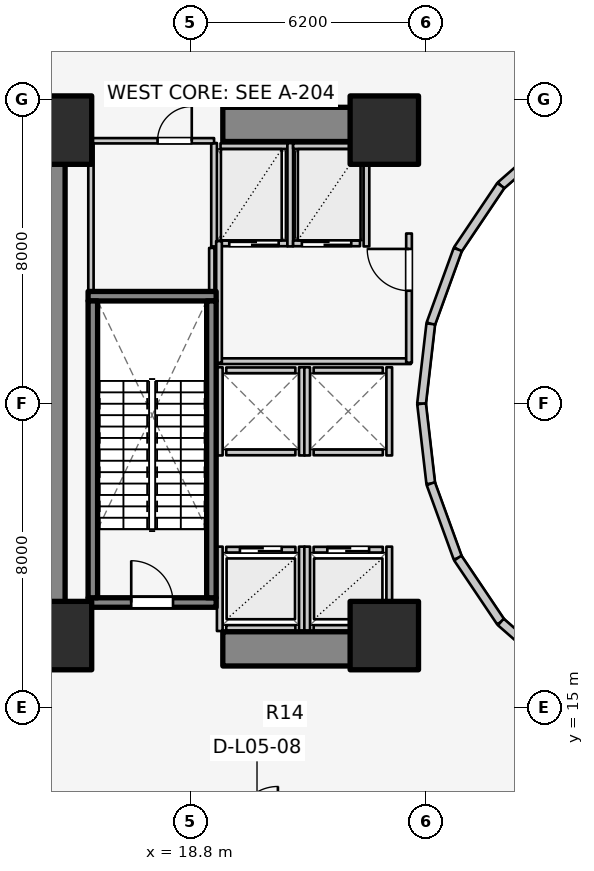
"""IFC4 building model, lengths in metres.
Left out: names, types, materials, properties, quantities, classifications, styles, units other than length and angle.
Written with IfcOpenShell. Run it as: python <this file> out.ifc"""

import sys

from ifc_helpers import new_model, si_unit, direction, frame, frame_2d, origin, origin_2d, place, context, subcontext, project, spatial, rectangle, extrude, element, fill, save


model = new_model("IFC4")
c1 = context("Model", 3, precision=1e-05, world=origin(), true_north=direction((0.0, 1.0)))
c2 = subcontext(c1, "Body", "Model", "MODEL_VIEW")
j1 = project(units=[si_unit("LENGTHUNIT", "METRE"), si_unit("PLANEANGLEUNIT", "RADIAN")], contexts=[c1])
p1 = place(None, origin())
s1 = spatial("IfcSite", under=j1, at=p1, CompositionType="ELEMENT")
p2 = place(p1, origin())
s2 = spatial("IfcBuilding", under=s1, at=p2, CompositionType="ELEMENT")
p3 = place(p2, frame((0.0, 0.0, 18.4)))
s3 = spatial("IfcBuildingStorey", under=s2, at=p3, CompositionType="ELEMENT", Elevation=18.4)
p4 = place(p3, frame((15.05, 17.05, 0.0), z_axis=(0.0, 0.0, 1.0), x_axis=(0.0, 1.0, 0.0)))
e1 = element("IfcWall", 1, at=p4, inside=s3, PredefinedType="SHEAR", context=c2, shape_type="SweptSolid", body=[
    extrude(rectangle(XDim=12.8, YDim=0.9, at=frame_2d((6.4, 0.0))), origin(), (0.0, 0.0, 1.0), 4.6),
])
for number, where, z_axis, x_axis in (
    (2, (19.65, 16.55, 0.0), (0.0, 0.0, 1.0), (1.0, 0.0, 0.0)),
    (3, (19.65, 30.35, 0.0), (0.0, 0.0, 1.0), (1.0, 0.0, 0.0)),
):
    element("IfcWall", number, at=place(p3, frame(where, z_axis=z_axis, x_axis=x_axis)), inside=s3, PredefinedType="SHEAR", context=c2, shape_type="SweptSolid", body=[
        extrude(rectangle(XDim=4.5, YDim=0.9, at=frame_2d((2.25, 0.0))), origin(), (0.0, 0.0, 1.0), 4.6),
    ])
p5 = place(p3, frame((16.105, 17.77, 0.0), z_axis=(0.0, 0.0, 1.0), x_axis=(1.0, 0.0, 0.0)))
e4 = element("IfcWall", 4, at=p5, inside=s3, PredefinedType="SOLIDWALL", context=c2, shape_type="SweptSolid", body=[
    extrude(rectangle(XDim=3.37, YDim=0.25, at=frame_2d((1.685, 0.0))), origin(), (0.0, 0.0, 1.0), 4.6),
])
p6 = place(p5, frame((1.135, 0.0, 0.0)))
e5 = element("IfcOpeningElement", 5, at=p6, cuts=e4, PredefinedType="OPENING", context=c2, shape_type="SweptSolid", body=[
    extrude(rectangle(XDim=1.1, YDim=2.1, at=frame_2d((0.55, 1.05))), frame((0.0, 0.135, 0.0), z_axis=(0.0, -1.0, 0.0), x_axis=(1.0, 0.0, 0.0)), (0.0, 0.0, 1.0), 0.27),
])
p7 = place(p3, frame((16.105, 25.83, 0.0), z_axis=(0.0, 0.0, 1.0), x_axis=(1.0, 0.0, 0.0)))
e6 = element("IfcWall", 6, at=p7, inside=s3, PredefinedType="SOLIDWALL", context=c2, shape_type="SweptSolid", body=[
    extrude(rectangle(XDim=3.37, YDim=0.25, at=frame_2d((1.685, 0.0))), origin(), (0.0, 0.0, 1.0), 4.6),
])
for number, where, z_axis, x_axis in (
    (7, (16.23, 17.895, 0.0), (0.0, 0.0, 1.0), (0.0, 1.0, 0.0)),
    (8, (19.35, 17.895, 0.0), (0.0, 0.0, 1.0), (0.0, 1.0, 0.0)),
):
    element("IfcWall", number, at=place(p3, frame(where, z_axis=z_axis, x_axis=x_axis)), inside=s3, PredefinedType="SOLIDWALL", context=c2, shape_type="SweptSolid", body=[
        extrude(rectangle(XDim=7.81, YDim=0.25, at=frame_2d((3.905, 0.0))), origin(), (0.0, 0.0, 1.0), 4.6),
    ])
for number, where, z_axis, x_axis in (
    (9, (15.3, 16.9, 0.0), (0.0, 0.0, 1.0), (1.0, 0.0, 0.0)),
    (10, (23.9, 16.9, 0.0), (0.0, 0.0, 1.0), (1.0, 0.0, 0.0)),
    (11, (23.9, 30.2, 0.0), (0.0, 0.0, 1.0), (1.0, 0.0, 0.0)),
    (12, (15.3, 30.2, 0.0), (0.0, 0.0, 1.0), (1.0, 0.0, 0.0)),
):
    element("IfcColumn", number, at=place(p3, frame(where, z_axis=z_axis, x_axis=x_axis)), inside=s3, PredefinedType="COLUMN", context=c2, shape_type="SweptSolid", body=[
        extrude(rectangle(XDim=1.8, YDim=1.8, at=origin_2d()), origin(), (0.0, 0.0, 1.0), 4.6),
    ])
p8 = place(p3, frame((28.44, 30.032, 0.0), z_axis=(0.0, 0.0, 1.0), x_axis=(-0.752576694707, -0.658504607869, 0.0)))
e13 = element("IfcWall", 13, at=p8, inside=s3, PredefinedType="STANDARD", context=c2, shape_type="SweptSolid", body=[
    extrude(rectangle(XDim=1.959, YDim=0.23, at=frame_2d((0.98, 0.0))), origin(), (0.0, 0.0, 1.0), 3.28),
])
p9 = place(p3, frame((26.965, 28.742, 0.0), z_axis=(0.0, 0.0, 1.0), x_axis=(-0.558197800898, -0.829707909492, 0.0)))
e14 = element("IfcWall", 14, at=p9, inside=s3, PredefinedType="STANDARD", context=c2, shape_type="SweptSolid", body=[
    extrude(rectangle(XDim=2.027, YDim=0.23, at=frame_2d((1.013, 0.0))), origin(), (0.0, 0.0, 1.0), 3.28),
])
p10 = place(p3, frame((25.834, 27.06, 0.0), z_axis=(0.0, 0.0, 1.0), x_axis=(-0.341423187295, -0.93990968033, 0.0)))
e15 = element("IfcWall", 15, at=p10, inside=s3, PredefinedType="STANDARD", context=c2, shape_type="SweptSolid", body=[
    extrude(rectangle(XDim=2.084, YDim=0.23, at=frame_2d((1.042, 0.0))), origin(), (0.0, 0.0, 1.0), 3.28),
])
for number, where, z_axis, x_axis in (
    (16, (25.123, 25.102, 0.0), (0.0, 0.0, 1.0), (-0.115, -0.993, 0.0)),
    (17, (24.88, 23.0, 0.0), (0.0, 0.0, 1.0), (0.115, -0.993, 0.0)),
):
    element("IfcWall", number, at=place(p3, frame(where, z_axis=z_axis, x_axis=x_axis)), inside=s3, PredefinedType="STANDARD", context=c2, shape_type="SweptSolid", body=[
        extrude(rectangle(XDim=2.115, YDim=0.23, at=frame_2d((1.058, 0.0))), origin(), (0.0, 0.0, 1.0), 3.28),
    ])
p11 = place(p3, frame((25.123, 20.898, 0.0), z_axis=(0.0, 0.0, 1.0), x_axis=(0.341423187295, -0.93990968033, 0.0)))
e18 = element("IfcWall", 18, at=p11, inside=s3, PredefinedType="STANDARD", context=c2, shape_type="SweptSolid", body=[
    extrude(rectangle(XDim=2.084, YDim=0.23, at=frame_2d((1.042, 0.0))), origin(), (0.0, 0.0, 1.0), 3.28),
])
p12 = place(p3, frame((25.834, 18.94, 0.0), z_axis=(0.0, 0.0, 1.0), x_axis=(0.558197800898, -0.829707909492, 0.0)))
e19 = element("IfcWall", 19, at=p12, inside=s3, PredefinedType="STANDARD", context=c2, shape_type="SweptSolid", body=[
    extrude(rectangle(XDim=2.027, YDim=0.23, at=frame_2d((1.013, 0.0))), origin(), (0.0, 0.0, 1.0), 3.28),
])
p13 = place(p3, frame((26.965, 17.258, 0.0), z_axis=(0.0, 0.0, 1.0), x_axis=(0.752576694707, -0.658504607869, 0.0)))
e20 = element("IfcWall", 20, at=p13, inside=s3, PredefinedType="STANDARD", context=c2, shape_type="SweptSolid", body=[
    extrude(rectangle(XDim=1.959, YDim=0.23, at=frame_2d((0.98, 0.0))), origin(), (0.0, 0.0, 1.0), 3.28),
])
p14 = place(p3, frame((19.74, 19.16, 0.0), z_axis=(0.0, 0.0, 1.0), x_axis=(1.0, 0.0, 0.0)))
e21 = element("IfcWall", 21, at=p14, inside=s3, PredefinedType="SOLIDWALL", context=c2, shape_type="SweptSolid", body=[
    extrude(rectangle(XDim=1.82, YDim=0.15, at=frame_2d((0.91, 0.0))), origin(), (0.0, 0.0, 1.0), 4.255),
])
p15 = place(p14, frame((0.36, 0.0, 0.0)))
e22 = element("IfcOpeningElement", 22, at=p15, cuts=e21, PredefinedType="OPENING", context=c2, shape_type="SweptSolid", body=[
    extrude(rectangle(XDim=1.1, YDim=2.1, at=frame_2d((0.55, 1.05))), frame((0.0, 0.085, 0.0), z_axis=(0.0, -1.0, 0.0), x_axis=(1.0, 0.0, 0.0)), (0.0, 0.0, 1.0), 0.17),
])
p16 = place(p3, frame((19.74, 17.1, 0.0), z_axis=(0.0, 0.0, 1.0), x_axis=(1.0, 0.0, 0.0)))
e23 = element("IfcWall", 23, at=p16, inside=s3, PredefinedType="SOLIDWALL", context=c2, shape_type="SweptSolid", body=[
    extrude(rectangle(XDim=1.82, YDim=0.15, at=frame_2d((0.91, 0.0))), origin(), (0.0, 0.0, 1.0), 4.255),
])
p17 = place(p3, frame((19.57, 17.02, 0.0), z_axis=(0.0, 0.0, 1.0), x_axis=(0.0, 1.0, 0.0)))
e24 = element("IfcWall", 24, at=p17, inside=s3, PredefinedType="SOLIDWALL", context=c2, shape_type="SweptSolid", body=[
    extrude(rectangle(XDim=2.22, YDim=0.15, at=frame_2d((1.11, 0.0))), origin(), (0.0, 0.0, 1.0), 3.62),
])
p18 = place(p3, frame((21.73, 17.02, 0.0), z_axis=(0.0, 0.0, 1.0), x_axis=(0.0, 1.0, 0.0)))
e25 = element("IfcWall", 25, at=p18, inside=s3, PredefinedType="SOLIDWALL", context=c2, shape_type="SweptSolid", body=[
    extrude(rectangle(XDim=2.22, YDim=0.15, at=frame_2d((1.11, 0.0))), origin(), (0.0, 0.0, 1.0), 4.255),
])
p19 = place(p3, frame((22.04, 19.16, 0.0), z_axis=(0.0, 0.0, 1.0), x_axis=(1.0, 0.0, 0.0)))
e26 = element("IfcWall", 26, at=p19, inside=s3, PredefinedType="SOLIDWALL", context=c2, shape_type="SweptSolid", body=[
    extrude(rectangle(XDim=1.82, YDim=0.15, at=frame_2d((0.91, 0.0))), origin(), (0.0, 0.0, 1.0), 3.62),
])
p20 = place(p19, frame((0.36, 0.0, 0.0)))
e27 = element("IfcOpeningElement", 27, at=p20, cuts=e26, PredefinedType="OPENING", context=c2, shape_type="SweptSolid", body=[
    extrude(rectangle(XDim=1.1, YDim=2.1, at=frame_2d((0.55, 1.05))), frame((0.0, 0.085, 0.0), z_axis=(0.0, -1.0, 0.0), x_axis=(1.0, 0.0, 0.0)), (0.0, 0.0, 1.0), 0.17),
])
p21 = place(p3, frame((22.04, 17.1, 0.0), z_axis=(0.0, 0.0, 1.0), x_axis=(1.0, 0.0, 0.0)))
e28 = element("IfcWall", 28, at=p21, inside=s3, PredefinedType="SOLIDWALL", context=c2, shape_type="SweptSolid", body=[
    extrude(rectangle(XDim=1.82, YDim=0.15, at=frame_2d((0.91, 0.0))), origin(), (0.0, 0.0, 1.0), 3.62),
])
p22 = place(p3, frame((21.87, 17.02, 0.0), z_axis=(0.0, 0.0, 1.0), x_axis=(0.0, 1.0, 0.0)))
e29 = element("IfcWall", 29, at=p22, inside=s3, PredefinedType="SOLIDWALL", context=c2, shape_type="SweptSolid", body=[
    extrude(rectangle(XDim=2.22, YDim=0.15, at=frame_2d((1.11, 0.0))), origin(), (0.0, 0.0, 1.0), 4.255),
])
p23 = place(p3, frame((24.03, 17.02, 0.0), z_axis=(0.0, 0.0, 1.0), x_axis=(0.0, 1.0, 0.0)))
e30 = element("IfcWall", 30, at=p23, inside=s3, PredefinedType="SOLIDWALL", context=c2, shape_type="SweptSolid", body=[
    extrude(rectangle(XDim=2.22, YDim=0.15, at=frame_2d((1.11, 0.0))), origin(), (0.0, 0.0, 1.0), 3.3),
])
for number, where, z_axis, x_axis in (
    (31, (19.74, 21.72, 0.0), (0.0, 0.0, 1.0), (1.0, 0.0, 0.0)),
    (32, (19.74, 23.88, 0.0), (0.0, 0.0, 1.0), (1.0, 0.0, 0.0)),
):
    element("IfcWall", number, at=place(p3, frame(where, z_axis=z_axis, x_axis=x_axis)), inside=s3, PredefinedType="SOLIDWALL", context=c2, shape_type="SweptSolid", body=[
        extrude(rectangle(XDim=1.82, YDim=0.15, at=frame_2d((0.91, 0.0))), origin(), (0.0, 0.0, 1.0), 4.255),
    ])
for number, where, z_axis, x_axis in (
    (33, (19.57, 21.64, 0.0), (0.0, 0.0, 1.0), (0.0, 1.0, 0.0)),
    (34, (21.73, 21.64, 0.0), (0.0, 0.0, 1.0), (0.0, 1.0, 0.0)),
):
    element("IfcWall", number, at=place(p3, frame(where, z_axis=z_axis, x_axis=x_axis)), inside=s3, PredefinedType="SOLIDWALL", context=c2, shape_type="SweptSolid", body=[
        extrude(rectangle(XDim=2.32, YDim=0.15, at=frame_2d((1.16, 0.0))), origin(), (0.0, 0.0, 1.0), 4.255),
    ])
for number, where, z_axis, x_axis in (
    (35, (22.04, 21.72, 0.0), (0.0, 0.0, 1.0), (1.0, 0.0, 0.0)),
    (36, (22.04, 23.88, 0.0), (0.0, 0.0, 1.0), (1.0, 0.0, 0.0)),
):
    element("IfcWall", number, at=place(p3, frame(where, z_axis=z_axis, x_axis=x_axis)), inside=s3, PredefinedType="SOLIDWALL", context=c2, shape_type="SweptSolid", body=[
        extrude(rectangle(XDim=1.82, YDim=0.15, at=frame_2d((0.91, 0.0))), origin(), (0.0, 0.0, 1.0), 3.62),
    ])
p24 = place(p3, frame((21.87, 21.64, 0.0), z_axis=(0.0, 0.0, 1.0), x_axis=(0.0, 1.0, 0.0)))
e37 = element("IfcWall", 37, at=p24, inside=s3, PredefinedType="SOLIDWALL", context=c2, shape_type="SweptSolid", body=[
    extrude(rectangle(XDim=2.32, YDim=0.15, at=frame_2d((1.16, 0.0))), origin(), (0.0, 0.0, 1.0), 4.255),
])
p25 = place(p3, frame((24.03, 21.64, 0.0), z_axis=(0.0, 0.0, 1.0), x_axis=(0.0, 1.0, 0.0)))
e38 = element("IfcWall", 38, at=p25, inside=s3, PredefinedType="SOLIDWALL", context=c2, shape_type="SweptSolid", body=[
    extrude(rectangle(XDim=2.32, YDim=0.15, at=frame_2d((1.16, 0.0))), origin(), (0.0, 0.0, 1.0), 3.62),
])
p26 = place(p3, frame((19.59, 27.22, 0.0), z_axis=(0.0, 0.0, 1.0), x_axis=(1.0, 0.0, 0.0)))
e39 = element("IfcWall", 39, at=p26, inside=s3, PredefinedType="SOLIDWALL", context=c2, shape_type="SweptSolid", body=[
    extrude(rectangle(XDim=1.76, YDim=0.15, at=frame_2d((0.88, 0.0))), origin(), (0.0, 0.0, 1.0), 4.255),
])
p27 = place(p26, frame((0.23, 0.0, 0.0)))
e40 = element("IfcOpeningElement", 40, at=p27, cuts=e39, PredefinedType="OPENING", context=c2, shape_type="SweptSolid", body=[
    extrude(rectangle(XDim=1.3, YDim=2.1, at=frame_2d((0.65, 1.05))), frame((0.0, 0.085, 0.0), z_axis=(0.0, -1.0, 0.0), x_axis=(1.0, 0.0, 0.0)), (0.0, 0.0, 1.0), 0.17),
])
p28 = place(p3, frame((19.59, 29.78, 0.0), z_axis=(0.0, 0.0, 1.0), x_axis=(1.0, 0.0, 0.0)))
e41 = element("IfcWall", 41, at=p28, inside=s3, PredefinedType="SOLIDWALL", context=c2, shape_type="SweptSolid", body=[
    extrude(rectangle(XDim=1.76, YDim=0.15, at=frame_2d((0.88, 0.0))), origin(), (0.0, 0.0, 1.0), 4.255),
])
for number, where, z_axis, x_axis in (
    (42, (19.42, 27.14, 0.0), (0.0, 0.0, 1.0), (0.0, 1.0, 0.0)),
    (43, (21.425, 27.14, 0.0), (0.0, 0.0, 1.0), (0.0, 1.0, 0.0)),
):
    element("IfcWall", number, at=place(p3, frame(where, z_axis=z_axis, x_axis=x_axis)), inside=s3, PredefinedType="SOLIDWALL", context=c2, shape_type="SweptSolid", body=[
        extrude(rectangle(XDim=2.72, YDim=0.15, at=frame_2d((1.36, 0.0))), origin(), (0.0, 0.0, 1.0), 4.255),
    ])
p29 = place(p3, frame((21.5, 27.22, 0.0), z_axis=(0.0, 0.0, 1.0), x_axis=(1.0, 0.0, 0.0)))
e44 = element("IfcWall", 44, at=p29, inside=s3, PredefinedType="SOLIDWALL", context=c2, shape_type="SweptSolid", body=[
    extrude(rectangle(XDim=1.76, YDim=0.15, at=frame_2d((0.88, 0.0))), origin(), (0.0, 0.0, 1.0), 4.255),
])
p30 = place(p29, frame((0.23, 0.0, 0.0)))
e45 = element("IfcOpeningElement", 45, at=p30, cuts=e44, PredefinedType="OPENING", context=c2, shape_type="SweptSolid", body=[
    extrude(rectangle(XDim=1.3, YDim=2.1, at=frame_2d((0.65, 1.05))), frame((0.0, 0.085, 0.0), z_axis=(0.0, -1.0, 0.0), x_axis=(1.0, 0.0, 0.0)), (0.0, 0.0, 1.0), 0.17),
])
p31 = place(p3, frame((21.5, 29.78, 0.0), z_axis=(0.0, 0.0, 1.0), x_axis=(1.0, 0.0, 0.0)))
e46 = element("IfcWall", 46, at=p31, inside=s3, PredefinedType="SOLIDWALL", context=c2, shape_type="SweptSolid", body=[
    extrude(rectangle(XDim=1.76, YDim=0.15, at=frame_2d((0.88, 0.0))), origin(), (0.0, 0.0, 1.0), 4.255),
])
p32 = place(p3, frame((23.43, 27.14, 0.0), z_axis=(0.0, 0.0, 1.0), x_axis=(0.0, 1.0, 0.0)))
e47 = element("IfcWall", 47, at=p32, inside=s3, PredefinedType="SOLIDWALL", context=c2, shape_type="SweptSolid", body=[
    extrude(rectangle(XDim=2.72, YDim=0.15, at=frame_2d((1.36, 0.0))), origin(), (0.0, 0.0, 1.0), 4.255),
])
p33 = place(p3, frame((19.52, 24.12, 0.0), z_axis=(0.0, 0.0, 1.0), x_axis=(1.0, 0.0, 0.0)))
e48 = element("IfcWall", 48, at=p33, inside=s3, PredefinedType="PARTITIONING", context=c2, shape_type="SweptSolid", body=[
    extrude(rectangle(XDim=5.08, YDim=0.15, at=frame_2d((2.54, 0.0))), origin(), (0.0, 0.0, 1.0), 3.62),
])
p34 = place(p3, frame((19.55, 24.08, 0.0), z_axis=(0.0, 0.0, 1.0), x_axis=(0.0, 1.0, 0.0)))
e49 = element("IfcWall", 49, at=p34, inside=s3, PredefinedType="PARTITIONING", context=c2, shape_type="SweptSolid", body=[
    extrude(rectangle(XDim=3.2, YDim=0.15, at=frame_2d((1.6, 0.0))), origin(), (0.0, 0.0, 1.0), 4.255),
])
p35 = place(p3, frame((24.55, 24.08, 0.0), z_axis=(0.0, 0.0, 1.0), x_axis=(0.0, 1.0, 0.0)))
e50 = element("IfcWall", 50, at=p35, inside=s3, PredefinedType="PARTITIONING", context=c2, shape_type="SweptSolid", body=[
    extrude(rectangle(XDim=3.4, YDim=0.15, at=frame_2d((1.7, 0.0))), origin(), (0.0, 0.0, 1.0), 4.255),
])
p36 = place(p35, frame((1.894, 0.0, 0.0)))
e51 = element("IfcOpeningElement", 51, at=p36, cuts=e50, PredefinedType="OPENING", context=c2, shape_type="SweptSolid", body=[
    extrude(rectangle(XDim=1.1, YDim=2.1, at=frame_2d((0.55, 1.05))), frame((0.0, 0.085, 0.0), z_axis=(0.0, -1.0, 0.0), x_axis=(1.0, 0.0, 0.0)), (0.0, 0.0, 1.0), 0.17),
])
p37 = place(p3, frame((16.12, 29.92, 0.0), z_axis=(0.0, 0.0, 1.0), x_axis=(1.0, 0.0, 0.0)))
e52 = element("IfcWall", 52, at=p37, inside=s3, PredefinedType="PLUMBINGWALL", context=c2, shape_type="SweptSolid", body=[
    extrude(rectangle(XDim=3.3, YDim=0.14, at=frame_2d((1.65, 0.0))), origin(), (0.0, 0.0, 1.0), 4.255),
])
p38 = place(p37, frame((1.813, 0.0, 0.0)))
e53 = element("IfcOpeningElement", 53, at=p38, cuts=e52, PredefinedType="OPENING", context=c2, shape_type="SweptSolid", body=[
    extrude(rectangle(XDim=0.9, YDim=2.1, at=frame_2d((0.45, 1.05))), frame((0.0, 0.08, 0.0), z_axis=(0.0, -1.0, 0.0), x_axis=(1.0, 0.0, 0.0)), (0.0, 0.0, 1.0), 0.16),
])
p39 = place(p3, frame((16.18, 25.98, 0.0), z_axis=(0.0, 0.0, 1.0), x_axis=(0.0, 1.0, 0.0)))
e54 = element("IfcWall", 54, at=p39, inside=s3, PredefinedType="PLUMBINGWALL", context=c2, shape_type="SweptSolid", body=[
    extrude(rectangle(XDim=3.88, YDim=0.14, at=frame_2d((1.94, 0.0))), origin(), (0.0, 0.0, 1.0), 4.255),
])
p40 = place(p3, frame((19.36, 25.98, 0.0), z_axis=(0.0, 0.0, 1.0), x_axis=(0.0, 1.0, 0.0)))
e55 = element("IfcWall", 55, at=p40, inside=s3, PredefinedType="PLUMBINGWALL", context=c2, shape_type="SweptSolid", body=[
    extrude(rectangle(XDim=1.12, YDim=0.14, at=frame_2d((0.56, 0.0))), origin(), (0.0, 0.0, 1.0), 4.255),
])
p41 = place(p6, origin())
e56 = element("IfcDoor", 56, at=p41, inside=s3, OperationType="SINGLE_SWING_LEFT", PredefinedType="DOOR", context=c2, shape_type="SweptSolid", body=[
    extrude(rectangle(XDim=1.1, YDim=2.1, at=frame_2d((0.55, 1.05))), frame((0.0, 0.025, 0.0), z_axis=(0.0, -1.0, 0.0), x_axis=(1.0, 0.0, 0.0)), (0.0, 0.0, 1.0), 0.05),
])
fill(e5, e56)
p42 = place(p15, origin())
e57 = element("IfcDoor", 57, at=p42, inside=s3, OperationType="DOUBLE_DOOR_SLIDING", PredefinedType="DOOR", context=c2, shape_type="SweptSolid", body=[
    extrude(rectangle(XDim=1.1, YDim=2.1, at=frame_2d((0.55, 1.05))), frame((0.0, 0.025, 0.0), z_axis=(0.0, -1.0, 0.0), x_axis=(1.0, 0.0, 0.0)), (0.0, 0.0, 1.0), 0.05),
])
fill(e22, e57)
p43 = place(p20, origin())
e58 = element("IfcDoor", 58, at=p43, inside=s3, OperationType="DOUBLE_DOOR_SLIDING", PredefinedType="DOOR", context=c2, shape_type="SweptSolid", body=[
    extrude(rectangle(XDim=1.1, YDim=2.1, at=frame_2d((0.55, 1.05))), frame((0.0, 0.025, 0.0), z_axis=(0.0, -1.0, 0.0), x_axis=(1.0, 0.0, 0.0)), (0.0, 0.0, 1.0), 0.05),
])
fill(e27, e58)
p44 = place(p27, origin())
e59 = element("IfcDoor", 59, at=p44, inside=s3, OperationType="DOUBLE_DOOR_SLIDING", PredefinedType="DOOR", context=c2, shape_type="SweptSolid", body=[
    extrude(rectangle(XDim=1.3, YDim=2.1, at=frame_2d((0.65, 1.05))), frame((0.0, 0.025, 0.0), z_axis=(0.0, -1.0, 0.0), x_axis=(1.0, 0.0, 0.0)), (0.0, 0.0, 1.0), 0.05),
])
fill(e40, e59)
p45 = place(p30, origin())
e60 = element("IfcDoor", 60, at=p45, inside=s3, OperationType="DOUBLE_DOOR_SLIDING", PredefinedType="DOOR", context=c2, shape_type="SweptSolid", body=[
    extrude(rectangle(XDim=1.3, YDim=2.1, at=frame_2d((0.65, 1.05))), frame((0.0, 0.025, 0.0), z_axis=(0.0, -1.0, 0.0), x_axis=(1.0, 0.0, 0.0)), (0.0, 0.0, 1.0), 0.05),
])
fill(e45, e60)
p46 = place(p36, origin())
e61 = element("IfcDoor", 61, at=p46, inside=s3, OperationType="SINGLE_SWING_RIGHT", PredefinedType="DOOR", context=c2, shape_type="SweptSolid", body=[
    extrude(rectangle(XDim=1.1, YDim=2.1, at=frame_2d((0.55, 1.05))), frame((0.0, 0.025, 0.0), z_axis=(0.0, -1.0, 0.0), x_axis=(1.0, 0.0, 0.0)), (0.0, 0.0, 1.0), 0.05),
])
fill(e51, e61)
p47 = place(p38, origin())
e62 = element("IfcDoor", 62, at=p47, inside=s3, OperationType="SINGLE_SWING_RIGHT", PredefinedType="DOOR", context=c2, shape_type="SweptSolid", body=[
    extrude(rectangle(XDim=0.9, YDim=2.1, at=frame_2d((0.45, 1.05))), frame((0.0, 0.025, 0.0), z_axis=(0.0, -1.0, 0.0), x_axis=(1.0, 0.0, 0.0)), (0.0, 0.0, 1.0), 0.05),
])
fill(e53, e62)
save(model, sys.argv[1])
